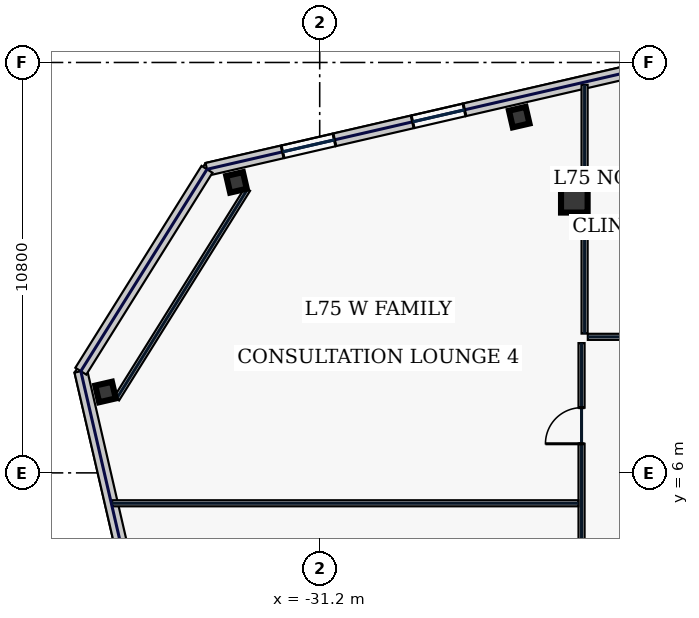
"""IFC4 building model, lengths in metres.
Left out: names, types, materials, properties, quantities, classifications, styles, units other than length and angle.
Written with IfcOpenShell. Run it as: python <this file> out.ifc"""

import sys

from ifc_helpers import new_model, si_unit, direction, frame, frame_2d, origin, origin_2d, place, context, subcontext, project, spatial, rectangle, hollow_rectangle, extrude, element, fill, save


model = new_model("IFC4")
c1 = context("Model", 3, precision=1e-05, world=origin(), true_north=direction((0.0, 1.0)))
c2 = subcontext(c1, "Body", "Model", "MODEL_VIEW")
j1 = project(units=[si_unit("LENGTHUNIT", "METRE"), si_unit("PLANEANGLEUNIT", "RADIAN")], contexts=[c1])
p1 = place(None, origin())
s1 = spatial("IfcSite", under=j1, at=p1, CompositionType="ELEMENT")
p2 = place(p1, origin())
s2 = spatial("IfcBuilding", under=s1, at=p2, CompositionType="ELEMENT")
p3 = place(p2, frame((0.0, 0.0, 321.0)))
s3 = spatial("IfcBuildingStorey", under=s2, at=p3, CompositionType="ELEMENT", Elevation=321.0)
p4 = place(p3, frame((-24.5, 13.2, 0.0), z_axis=(0.0, 0.0, 1.0), x_axis=(1.0, 0.0, 0.0)))
e1 = element("IfcColumn", 1, at=p4, inside=s3, PredefinedType="COLUMN", context=c2, shape_type="SweptSolid", body=[
    extrude(hollow_rectangle(XDim=0.7, YDim=0.7, WallThickness=0.032, at=origin_2d()), origin(), (0.0, 0.0, 1.0), 3.74),
])
for number, where, z_axis, x_axis in (
    (2, (-25.95, 15.362, 0.0), (0.0, 0.0, 1.0), (0.974, 0.225, 0.0)),
    (3, (-33.389, 13.645, 0.0), (0.0, 0.0, 1.0), (0.974, 0.225, 0.0)),
    (4, (-36.836, 8.128, 0.0), (0.0, 0.0, 1.0), (0.974, 0.225, 0.0)),
):
    element("IfcColumn", number, at=place(p3, frame(where, z_axis=z_axis, x_axis=x_axis)), inside=s3, PredefinedType="COLUMN", context=c2, shape_type="SweptSolid", body=[
        extrude(hollow_rectangle(XDim=0.45, YDim=0.45, WallThickness=0.022, at=origin_2d()), origin(), (0.0, 0.0, 1.0), 3.74),
    ])
p5 = place(p3, frame((-17.245, 17.895, 0.0), z_axis=(0.0, 0.0, 1.0), x_axis=(-0.97437318493, -0.224937539085, 0.0)))
e5 = element("IfcWall", 5, at=p5, inside=s3, PredefinedType="STANDARD", context=c2, shape_type="SweptSolid", body=[
    extrude(rectangle(XDim=17.366, YDim=0.34, at=frame_2d((8.683, 0.0))), origin(), (0.0, 0.0, 1.0), 3.74),
])
p6 = place(p5, frame((13.925, 0.0, 1.0)))
e6 = element("IfcOpeningElement", 6, at=p6, cuts=e5, PredefinedType="OPENING", context=c2, shape_type="SweptSolid", body=[
    extrude(rectangle(XDim=1.4, YDim=1.85, at=frame_2d((0.7, 0.925))), frame((0.0, 0.18, 0.0), z_axis=(0.0, -1.0, 0.0), x_axis=(1.0, 0.0, 0.0)), (0.0, 0.0, 1.0), 0.36),
])
p7 = place(p5, frame((10.413, 0.0, 1.0)))
e7 = element("IfcOpeningElement", 7, at=p7, cuts=e5, PredefinedType="OPENING", context=c2, shape_type="SweptSolid", body=[
    extrude(rectangle(XDim=1.4, YDim=1.85, at=frame_2d((0.7, 0.925))), frame((0.0, 0.18, 0.0), z_axis=(0.0, -1.0, 0.0), x_axis=(1.0, 0.0, 0.0)), (0.0, 0.0, 1.0), 0.36),
])
p8 = place(p5, frame((3.329, 0.0, 1.0)))
e8 = element("IfcOpeningElement", 8, at=p8, cuts=e5, PredefinedType="OPENING", context=c2, shape_type="SweptSolid", body=[
    extrude(rectangle(XDim=0.85, YDim=1.85, at=frame_2d((0.425, 0.925))), frame((0.0, 0.18, 0.0), z_axis=(0.0, -1.0, 0.0), x_axis=(1.0, 0.0, 0.0)), (0.0, 0.0, 1.0), 0.36),
])
p9 = place(p3, frame((-37.486, 8.676, 0.0), z_axis=(0.0, 0.0, 1.0), x_axis=(0.224953091034, -0.974369594576, 0.0)))
e9 = element("IfcWall", 9, at=p9, inside=s3, PredefinedType="STANDARD", context=c2, shape_type="SweptSolid", body=[
    extrude(rectangle(XDim=36.2, YDim=0.34, at=frame_2d((18.1, 0.0))), origin(), (0.0, 0.0, 1.0), 3.74),
])
p10 = place(p9, frame((4.825, 0.0, 0.75)))
e10 = element("IfcOpeningElement", 10, at=p10, cuts=e9, PredefinedType="OPENING", context=c2, shape_type="SweptSolid", body=[
    extrude(rectangle(XDim=0.85, YDim=1.85, at=frame_2d((0.425, 0.925))), frame((0.0, 0.18, 0.0), z_axis=(0.0, -1.0, 0.0), x_axis=(1.0, 0.0, 0.0)), (0.0, 0.0, 1.0), 0.36),
])
p11 = place(p9, frame((12.425, 0.0, 0.75)))
e11 = element("IfcOpeningElement", 11, at=p11, cuts=e9, PredefinedType="OPENING", context=c2, shape_type="SweptSolid", body=[
    extrude(rectangle(XDim=0.85, YDim=1.85, at=frame_2d((0.425, 0.925))), frame((0.0, 0.18, 0.0), z_axis=(0.0, -1.0, 0.0), x_axis=(1.0, 0.0, 0.0)), (0.0, 0.0, 1.0), 0.36),
])
p12 = place(p9, frame((21.825, 0.0, 0.58)))
e12 = element("IfcOpeningElement", 12, at=p12, cuts=e9, PredefinedType="OPENING", context=c2, shape_type="SweptSolid", body=[
    extrude(rectangle(XDim=1.6, YDim=2.3, at=frame_2d((0.8, 1.15))), frame((0.0, 0.18, 0.0), z_axis=(0.0, -1.0, 0.0), x_axis=(1.0, 0.0, 0.0)), (0.0, 0.0, 1.0), 0.36),
])
p13 = place(p9, frame((30.875, 0.0, 0.58)))
e13 = element("IfcOpeningElement", 13, at=p13, cuts=e9, PredefinedType="OPENING", context=c2, shape_type="SweptSolid", body=[
    extrude(rectangle(XDim=1.6, YDim=2.3, at=frame_2d((0.8, 1.15))), frame((0.0, 0.18, 0.0), z_axis=(0.0, -1.0, 0.0), x_axis=(1.0, 0.0, 0.0)), (0.0, 0.0, 1.0), 0.36),
])
p14 = place(p3, frame((-34.166, 13.989, 0.0), z_axis=(0.0, 0.0, 1.0), x_axis=(-0.529935887993, -0.848037708252, 0.0)))
e14 = element("IfcWall", 14, at=p14, inside=s3, PredefinedType="STANDARD", context=c2, shape_type="SweptSolid", body=[
    extrude(rectangle(XDim=6.265, YDim=0.34, at=frame_2d((3.133, 0.0))), origin(), (0.0, 0.0, 1.0), 3.74),
])
p15 = place(p3, frame((-33.1, 13.465, 0.0), z_axis=(0.0, 0.0, 1.0), x_axis=(-0.529958457806, -0.848023604035, 0.0)))
e15 = element("IfcWall", 15, at=p15, inside=s3, PredefinedType="PARTITIONING", context=c2, shape_type="SweptSolid", body=[
    extrude(rectangle(XDim=6.505, YDim=0.16, at=frame_2d((3.252, 0.0))), origin(), (0.0, 0.0, 1.0), 3.74),
])
p16 = place(p3, frame((-24.31, -9.215, 0.0), z_axis=(0.0, 0.0, 1.0), x_axis=(0.0, 1.0, 0.0)))
e16 = element("IfcWall", 16, at=p16, inside=s3, PredefinedType="PARTITIONING", context=c2, shape_type="SweptSolid", body=[
    extrude(rectangle(XDim=18.63, YDim=0.16, at=frame_2d((9.315, 0.0))), origin(), (0.0, 0.0, 1.0), 3.74),
])
p17 = place(p16, frame((1.769, 0.0, 0.0)))
e17 = element("IfcOpeningElement", 17, at=p17, cuts=e16, PredefinedType="OPENING", context=c2, shape_type="SweptSolid", body=[
    extrude(rectangle(XDim=0.95, YDim=2.2, at=frame_2d((0.475, 1.1))), frame((0.0, 0.09, 0.0), z_axis=(0.0, -1.0, 0.0), x_axis=(1.0, 0.0, 0.0)), (0.0, 0.0, 1.0), 0.18),
])
p18 = place(p16, frame((5.6, 0.0, 0.0)))
e18 = element("IfcOpeningElement", 18, at=p18, cuts=e16, PredefinedType="OPENING", context=c2, shape_type="SweptSolid", body=[
    extrude(rectangle(XDim=0.95, YDim=2.2, at=frame_2d((0.475, 1.1))), frame((0.0, 0.09, 0.0), z_axis=(0.0, -1.0, 0.0), x_axis=(1.0, 0.0, 0.0)), (0.0, 0.0, 1.0), 0.18),
])
p19 = place(p16, frame((10.8, 0.0, 0.0)))
e19 = element("IfcOpeningElement", 19, at=p19, cuts=e16, PredefinedType="OPENING", context=c2, shape_type="SweptSolid", body=[
    extrude(rectangle(XDim=0.95, YDim=2.2, at=frame_2d((0.475, 1.1))), frame((0.0, 0.09, 0.0), z_axis=(0.0, -1.0, 0.0), x_axis=(1.0, 0.0, 0.0)), (0.0, 0.0, 1.0), 0.18),
])
p20 = place(p16, frame((15.981, 0.0, 0.0)))
e20 = element("IfcOpeningElement", 20, at=p20, cuts=e16, PredefinedType="OPENING", context=c2, shape_type="SweptSolid", body=[
    extrude(rectangle(XDim=0.95, YDim=2.2, at=frame_2d((0.475, 1.1))), frame((0.0, 0.09, 0.0), z_axis=(0.0, -1.0, 0.0), x_axis=(1.0, 0.0, 0.0)), (0.0, 0.0, 1.0), 0.18),
])
p21 = place(p3, frame((-24.145, 9.58, 0.0), z_axis=(0.0, 0.0, 1.0), x_axis=(1.0, 0.0, 0.0)))
e21 = element("IfcWall", 21, at=p21, inside=s3, PredefinedType="PARTITIONING", context=c2, shape_type="SweptSolid", body=[
    extrude(rectangle(XDim=48.29, YDim=0.16, at=frame_2d((24.145, 0.0))), origin(), (0.0, 0.0, 1.0), 3.74),
])
p22 = place(p21, frame((1.869, 0.0, 0.0)))
e22 = element("IfcOpeningElement", 22, at=p22, cuts=e21, PredefinedType="OPENING", context=c2, shape_type="SweptSolid", body=[
    extrude(rectangle(XDim=1.3, YDim=2.2, at=frame_2d((0.65, 1.1))), frame((0.0, 0.09, 0.0), z_axis=(0.0, -1.0, 0.0), x_axis=(1.0, 0.0, 0.0)), (0.0, 0.0, 1.0), 0.18),
])
p23 = place(p21, frame((8.385, 0.0, 0.0)))
e23 = element("IfcOpeningElement", 23, at=p23, cuts=e21, PredefinedType="OPENING", context=c2, shape_type="SweptSolid", body=[
    extrude(rectangle(XDim=0.95, YDim=2.2, at=frame_2d((0.475, 1.1))), frame((0.0, 0.09, 0.0), z_axis=(0.0, -1.0, 0.0), x_axis=(1.0, 0.0, 0.0)), (0.0, 0.0, 1.0), 0.18),
])
p24 = place(p21, frame((16.475, 0.0, 0.0)))
e24 = element("IfcOpeningElement", 24, at=p24, cuts=e21, PredefinedType="OPENING", context=c2, shape_type="SweptSolid", body=[
    extrude(rectangle(XDim=0.95, YDim=2.2, at=frame_2d((0.475, 1.1))), frame((0.0, 0.09, 0.0), z_axis=(0.0, -1.0, 0.0), x_axis=(1.0, 0.0, 0.0)), (0.0, 0.0, 1.0), 0.18),
])
p25 = place(p21, frame((23.055, 0.0, 0.0)))
e25 = element("IfcOpeningElement", 25, at=p25, cuts=e21, PredefinedType="OPENING", context=c2, shape_type="SweptSolid", body=[
    extrude(rectangle(XDim=0.95, YDim=2.2, at=frame_2d((0.475, 1.1))), frame((0.0, 0.09, 0.0), z_axis=(0.0, -1.0, 0.0), x_axis=(1.0, 0.0, 0.0)), (0.0, 0.0, 1.0), 0.18),
])
p26 = place(p21, frame((29.085, 0.0, 0.0)))
e26 = element("IfcOpeningElement", 26, at=p26, cuts=e21, PredefinedType="OPENING", context=c2, shape_type="SweptSolid", body=[
    extrude(rectangle(XDim=1.45, YDim=2.2, at=frame_2d((0.725, 1.1))), frame((0.0, 0.09, 0.0), z_axis=(0.0, -1.0, 0.0), x_axis=(1.0, 0.0, 0.0)), (0.0, 0.0, 1.0), 0.18),
])
p27 = place(p21, frame((35.82, 0.0, 0.0)))
e27 = element("IfcOpeningElement", 27, at=p27, cuts=e21, PredefinedType="OPENING", context=c2, shape_type="SweptSolid", body=[
    extrude(rectangle(XDim=1.15, YDim=2.2, at=frame_2d((0.575, 1.1))), frame((0.0, 0.09, 0.0), z_axis=(0.0, -1.0, 0.0), x_axis=(1.0, 0.0, 0.0)), (0.0, 0.0, 1.0), 0.18),
])
p28 = place(p21, frame((41.105, 0.0, 0.0)))
e28 = element("IfcOpeningElement", 28, at=p28, cuts=e21, PredefinedType="OPENING", context=c2, shape_type="SweptSolid", body=[
    extrude(rectangle(XDim=0.95, YDim=2.2, at=frame_2d((0.475, 1.1))), frame((0.0, 0.09, 0.0), z_axis=(0.0, -1.0, 0.0), x_axis=(1.0, 0.0, 0.0)), (0.0, 0.0, 1.0), 0.18),
])
p29 = place(p21, frame((45.466, 0.0, 0.0)))
e29 = element("IfcOpeningElement", 29, at=p29, cuts=e21, PredefinedType="OPENING", context=c2, shape_type="SweptSolid", body=[
    extrude(rectangle(XDim=0.95, YDim=2.2, at=frame_2d((0.475, 1.1))), frame((0.0, 0.09, 0.0), z_axis=(0.0, -1.0, 0.0), x_axis=(1.0, 0.0, 0.0)), (0.0, 0.0, 1.0), 0.18),
])
p30 = place(p3, frame((-24.23, 9.665, 0.0), z_axis=(0.0, 0.0, 1.0), x_axis=(0.0, 1.0, 0.0)))
e30 = element("IfcWall", 30, at=p30, inside=s3, PredefinedType="PARTITIONING", context=c2, shape_type="SweptSolid", body=[
    extrude(rectangle(XDim=6.546, YDim=0.16, at=frame_2d((3.273, 0.0))), origin(), (0.0, 0.0, 1.0), 3.74),
])
p31 = place(p3, frame((-36.663, 5.2, 0.0), z_axis=(0.0, 0.0, 1.0), x_axis=(1.0, 0.0, 0.0)))
e31 = element("IfcWall", 31, at=p31, inside=s3, PredefinedType="PARTITIONING", context=c2, shape_type="SweptSolid", body=[
    extrude(rectangle(XDim=12.268, YDim=0.16, at=frame_2d((6.134, 0.0))), origin(), (0.0, 0.0, 1.0), 3.74),
])
p32 = place(p6, origin())
e32 = element("IfcWindow", 32, at=p32, inside=s3, PartitioningType="SINGLE_PANEL", PredefinedType="WINDOW", context=c2, shape_type="SweptSolid", body=[
    extrude(rectangle(XDim=1.4, YDim=1.85, at=frame_2d((0.7, 0.925))), frame((0.0, 0.03, 0.0), z_axis=(0.0, -1.0, 0.0), x_axis=(1.0, 0.0, 0.0)), (0.0, 0.0, 1.0), 0.06),
])
fill(e6, e32)
p33 = place(p7, origin())
e33 = element("IfcWindow", 33, at=p33, inside=s3, PartitioningType="SINGLE_PANEL", PredefinedType="WINDOW", context=c2, shape_type="SweptSolid", body=[
    extrude(rectangle(XDim=1.4, YDim=1.85, at=frame_2d((0.7, 0.925))), frame((0.0, 0.03, 0.0), z_axis=(0.0, -1.0, 0.0), x_axis=(1.0, 0.0, 0.0)), (0.0, 0.0, 1.0), 0.06),
])
fill(e7, e33)
p34 = place(p20, origin())
e34 = element("IfcDoor", 34, at=p34, inside=s3, OperationType="SINGLE_SWING_LEFT", PredefinedType="DOOR", context=c2, shape_type="SweptSolid", body=[
    extrude(rectangle(XDim=0.95, YDim=2.2, at=frame_2d((0.475, 1.1))), frame((0.0, 0.025, 0.0), z_axis=(0.0, -1.0, 0.0), x_axis=(1.0, 0.0, 0.0)), (0.0, 0.0, 1.0), 0.05),
])
fill(e20, e34)
save(model, sys.argv[1])
